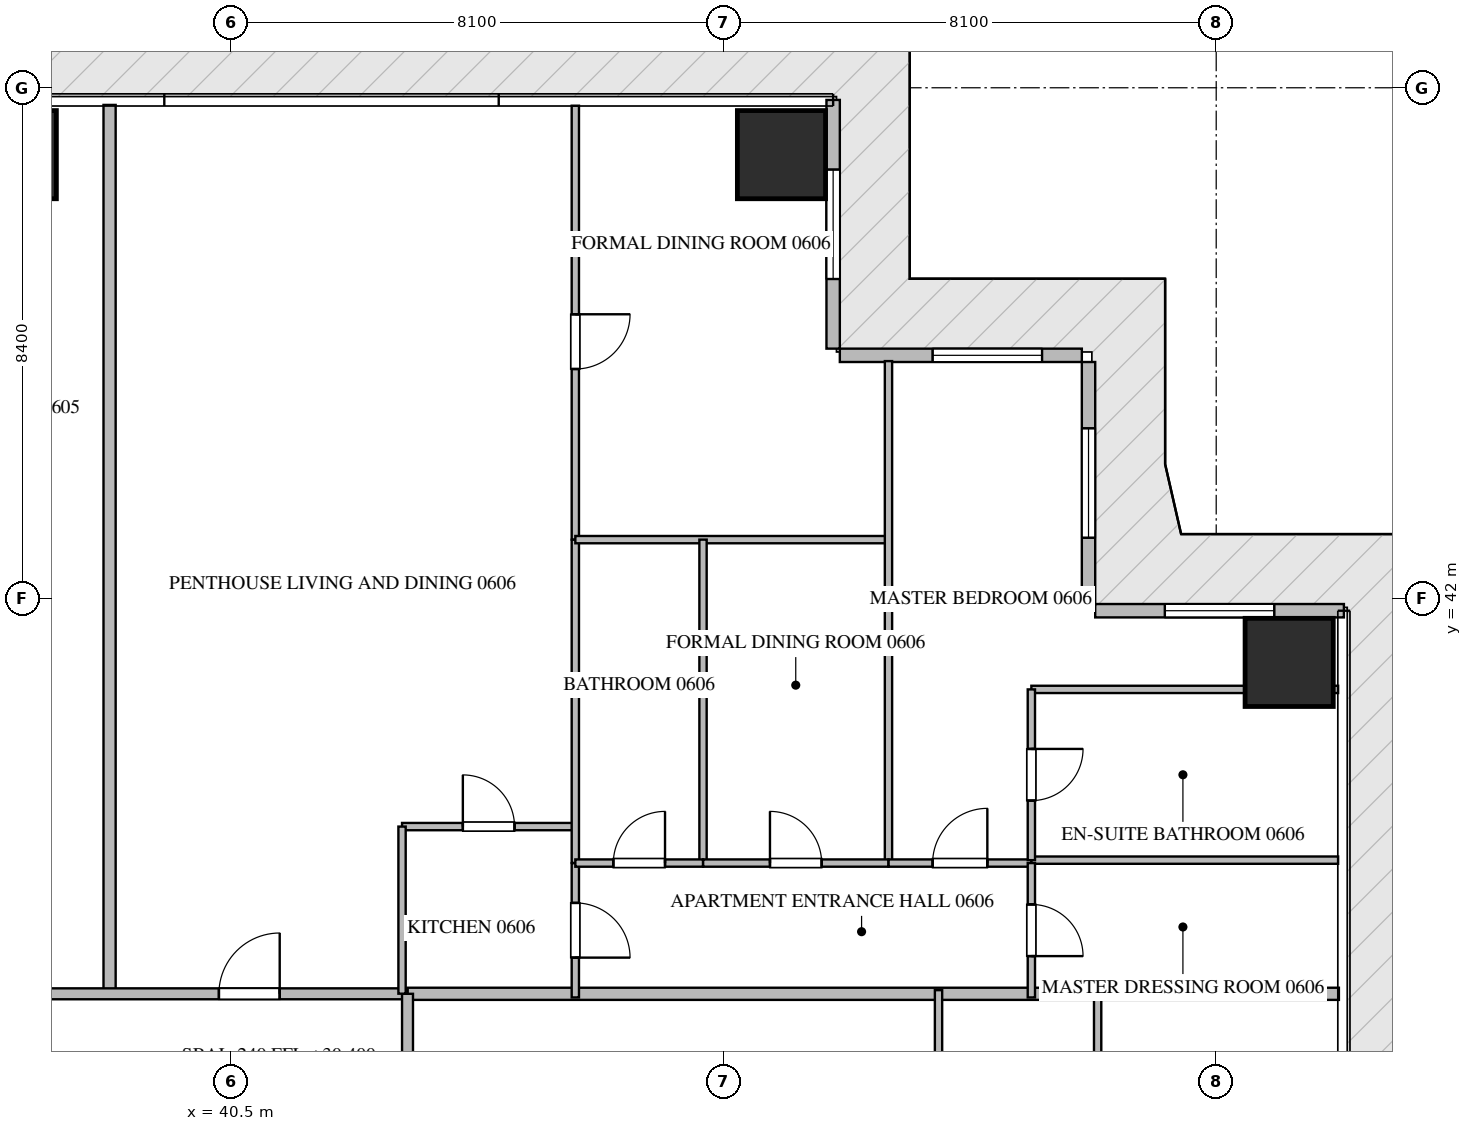
"""IFC4 building model, lengths in metres.
Left out: names, types, materials, properties, quantities, classifications, styles, units other than length and angle.
Written with IfcOpenShell. Run it as: python <this file> out.ifc"""

import sys

from ifc_helpers import new_model, si_unit, direction, frame, frame_2d, origin, origin_2d, place, context, subcontext, project, spatial, rectangle, extrude, source, transform, mapped, element, fill, save


model = new_model("IFC4")
c1 = context("Model", 3, precision=1e-05, world=origin(), true_north=direction((0.0, 1.0)))
c2 = subcontext(c1, "Body", "Model", "MODEL_VIEW")
j1 = project(units=[si_unit("LENGTHUNIT", "METRE"), si_unit("PLANEANGLEUNIT", "RADIAN")], contexts=[c1])
p1 = place(None, origin())
s1 = spatial("IfcSite", under=j1, at=p1, CompositionType="ELEMENT")
p2 = place(p1, origin())
s2 = spatial("IfcBuilding", under=s1, at=p2, CompositionType="ELEMENT")
p3 = place(p2, frame((0.0, 0.0, 30.45)))
s3 = spatial("IfcBuildingStorey", under=s2, at=p3, CompositionType="ELEMENT", Elevation=30.45)
m1 = source(origin(), c2, "Body", "SweptSolid", [
    extrude(rectangle(XDim=1.45, YDim=1.45, at=origin_2d()), origin(), (0.0, 0.0, 1.0), 3.75),
])
for number, where, z_axis, x_axis in (
    (1, (36.9, 49.3, -0.26), (0.0, 0.0, 1.0), (1.0, 0.0, 0.0)),
    (2, (49.55, 49.3, -0.26), (0.0, 0.0, 1.0), (1.0, 0.0, 0.0)),
    (3, (57.9, 40.95, -0.26), (0.0, 0.0, 1.0), (1.0, 0.0, 0.0)),
):
    element("IfcColumn", number, at=place(p3, frame(where, z_axis=z_axis, x_axis=x_axis)), inside=s3, PredefinedType="COLUMN", context=c2, shape_type="MappedRepresentation", body=[
        mapped(m1, transform((0.0, 0.0, 0.0), scale=1.0)),
    ])
p4 = place(p3, frame((58.8, 41.8, 0.0), z_axis=(0.0, 0.0, 1.0), x_axis=(-1.0, 0.0, 0.0)))
e4 = element("IfcWall", 4, at=p4, inside=s3, PredefinedType="ELEMENTEDWALL", context=c2, shape_type="SweptSolid", body=[
    extrude(rectangle(XDim=4.09, YDim=0.22, at=frame_2d((2.045, 0.0))), origin(), (0.0, 0.0, 1.0), 3.475),
])
p5 = place(p4, frame((1.145, 0.0, 0.65)))
e5 = element("IfcOpeningElement", 5, at=p5, cuts=e4, PredefinedType="OPENING", context=c2, shape_type="SweptSolid", body=[
    extrude(rectangle(XDim=1.8, YDim=2.1, at=frame_2d((0.9, 1.05))), frame((0.0, 0.12, 0.0), z_axis=(0.0, -1.0, 0.0), x_axis=(1.0, 0.0, 0.0)), (0.0, 0.0, 1.0), 0.24),
])
p6 = place(p3, frame((54.6, 41.91, 0.0), z_axis=(0.0, 0.0, 1.0), x_axis=(0.0, 1.0, 0.0)))
e6 = element("IfcWall", 6, at=p6, inside=s3, PredefinedType="ELEMENTEDWALL", context=c2, shape_type="SweptSolid", body=[
    extrude(rectangle(XDim=3.98, YDim=0.22, at=frame_2d((1.99, 0.0))), origin(), (0.0, 0.0, 1.0), 3.475),
])
p7 = place(p6, frame((1.09, 0.0, 0.65)))
e7 = element("IfcOpeningElement", 7, at=p7, cuts=e6, PredefinedType="OPENING", context=c2, shape_type="SweptSolid", body=[
    extrude(rectangle(XDim=1.8, YDim=2.1, at=frame_2d((0.9, 1.05))), frame((0.0, 0.12, 0.0), z_axis=(0.0, -1.0, 0.0), x_axis=(1.0, 0.0, 0.0)), (0.0, 0.0, 1.0), 0.24),
])
p8 = place(p3, frame((54.49, 46.0, 0.0), z_axis=(0.0, 0.0, 1.0), x_axis=(-1.0, 0.0, 0.0)))
e8 = element("IfcWall", 8, at=p8, inside=s3, PredefinedType="ELEMENTEDWALL", context=c2, shape_type="SweptSolid", body=[
    extrude(rectangle(XDim=3.98, YDim=0.22, at=frame_2d((1.99, 0.0))), origin(), (0.0, 0.0, 1.0), 3.475),
])
p9 = place(p8, frame((0.654, 0.0, 0.65)))
e9 = element("IfcOpeningElement", 9, at=p9, cuts=e8, PredefinedType="OPENING", context=c2, shape_type="SweptSolid", body=[
    extrude(rectangle(XDim=1.8, YDim=2.1, at=frame_2d((0.9, 1.05))), frame((0.0, 0.12, 0.0), z_axis=(0.0, -1.0, 0.0), x_axis=(1.0, 0.0, 0.0)), (0.0, 0.0, 1.0), 0.24),
])
p10 = place(p3, frame((50.4, 46.11, 0.0), z_axis=(0.0, 0.0, 1.0), x_axis=(0.0, 1.0, 0.0)))
e10 = element("IfcWall", 10, at=p10, inside=s3, PredefinedType="ELEMENTEDWALL", context=c2, shape_type="SweptSolid", body=[
    extrude(rectangle(XDim=4.09, YDim=0.22, at=frame_2d((2.045, 0.0))), origin(), (0.0, 0.0, 1.0), 3.475),
])
p11 = place(p10, frame((1.145, 0.0, 0.65)))
e11 = element("IfcOpeningElement", 11, at=p11, cuts=e10, PredefinedType="OPENING", context=c2, shape_type="SweptSolid", body=[
    extrude(rectangle(XDim=1.8, YDim=2.1, at=frame_2d((0.9, 1.05))), frame((0.0, 0.12, 0.0), z_axis=(0.0, -1.0, 0.0), x_axis=(1.0, 0.0, 0.0)), (0.0, 0.0, 1.0), 0.24),
])
p12 = place(p3, frame((38.5, 35.5, 0.0), z_axis=(0.0, 0.0, 1.0), x_axis=(0.0, 1.0, 0.0)))
e12 = element("IfcWall", 12, at=p12, inside=s3, PredefinedType="PARTITIONING", context=c2, shape_type="SweptSolid", body=[
    extrude(rectangle(XDim=14.618, YDim=0.2, at=frame_2d((7.309, 0.0))), origin(), (0.0, 0.0, 1.0), 3.49),
])
p13 = place(p3, frame((43.4, 35.5, 0.0), z_axis=(0.0, 0.0, 1.0), x_axis=(1.0, 0.0, 0.0)))
e13 = element("IfcWall", 13, at=p13, inside=s3, PredefinedType="PARTITIONING", context=c2, shape_type="SweptSolid", body=[
    extrude(rectangle(XDim=15.318, YDim=0.2, at=frame_2d((7.659, 0.0))), origin(), (0.0, 0.0, 1.0), 3.49),
])
p14 = place(p3, frame((21.402, 35.5, 0.0), z_axis=(0.0, 0.0, 1.0), x_axis=(1.0, 0.0, 0.0)))
e14 = element("IfcWall", 14, at=p14, inside=s3, PredefinedType="PARTITIONING", context=c2, shape_type="SweptSolid", body=[
    extrude(rectangle(XDim=21.996, YDim=0.18, at=frame_2d((10.998, 0.0))), origin(), (0.0, 0.0, 1.0), 3.49),
])
p15 = place(p14, frame((2.1, 0.0, 0.0)))
e15 = element("IfcOpeningElement", 15, at=p15, cuts=e14, PredefinedType="OPENING", context=c2, shape_type="SweptSolid", body=[
    extrude(rectangle(XDim=1.0, YDim=2.15, at=frame_2d((0.5, 1.075))), frame((0.0, 0.1, 0.0), z_axis=(0.0, -1.0, 0.0), x_axis=(1.0, 0.0, 0.0)), (0.0, 0.0, 1.0), 0.2),
])
p16 = place(p14, frame((14.277, 0.0, 0.0)))
e16 = element("IfcOpeningElement", 16, at=p16, cuts=e14, PredefinedType="OPENING", context=c2, shape_type="SweptSolid", body=[
    extrude(rectangle(XDim=1.0, YDim=2.15, at=frame_2d((0.5, 1.075))), frame((0.0, 0.1, 0.0), z_axis=(0.0, -1.0, 0.0), x_axis=(1.0, 0.0, 0.0)), (0.0, 0.0, 1.0), 0.2),
])
p17 = place(p14, frame((18.896, 0.0, 0.0)))
e17 = element("IfcOpeningElement", 17, at=p17, cuts=e14, PredefinedType="OPENING", context=c2, shape_type="SweptSolid", body=[
    extrude(rectangle(XDim=1.0, YDim=2.15, at=frame_2d((0.5, 1.075))), frame((0.0, 0.1, 0.0), z_axis=(0.0, -1.0, 0.0), x_axis=(1.0, 0.0, 0.0)), (0.0, 0.0, 1.0), 0.2),
])
p18 = place(p3, frame((43.4, 14.9, 0.0), z_axis=(0.0, 0.0, 1.0), x_axis=(0.0, 1.0, 0.0)))
e18 = element("IfcWall", 18, at=p18, inside=s3, PredefinedType="PARTITIONING", context=c2, shape_type="SweptSolid", body=[
    extrude(rectangle(XDim=20.6, YDim=0.18, at=frame_2d((10.3, 0.0))), origin(), (0.0, 0.0, 1.0), 3.49),
])
p19 = place(p18, frame((1.96, 0.0, 0.0)))
e19 = element("IfcOpeningElement", 19, at=p19, cuts=e18, PredefinedType="OPENING", context=c2, shape_type="SweptSolid", body=[
    extrude(rectangle(XDim=1.0, YDim=2.15, at=frame_2d((0.5, 1.075))), frame((0.0, 0.1, 0.0), z_axis=(0.0, -1.0, 0.0), x_axis=(1.0, 0.0, 0.0)), (0.0, 0.0, 1.0), 0.2),
])
p20 = place(p3, frame((43.31, 38.25, 0.0), z_axis=(0.0, 0.0, 1.0), x_axis=(1.0, 0.0, 0.0)))
e20 = element("IfcWall", 20, at=p20, inside=s3, PredefinedType="PARTITIONING", context=c2, shape_type="SweptSolid", body=[
    extrude(rectangle(XDim=2.85, YDim=0.12, at=frame_2d((1.425, 0.0))), origin(), (0.0, 0.0, 1.0), 3.49),
])
p21 = place(p20, frame((1.0, 0.0, 0.0)))
e21 = element("IfcOpeningElement", 21, at=p21, cuts=e20, PredefinedType="OPENING", context=c2, shape_type="SweptSolid", body=[
    extrude(rectangle(XDim=0.85, YDim=2.1, at=frame_2d((0.425, 1.05))), frame((0.0, 0.07, 0.0), z_axis=(0.0, -1.0, 0.0), x_axis=(1.0, 0.0, 0.0)), (0.0, 0.0, 1.0), 0.14),
])
p22 = place(p3, frame((43.31, 38.25, 0.0), z_axis=(0.0, 0.0, 1.0), x_axis=(0.0, -1.0, 0.0)))
e22 = element("IfcWall", 22, at=p22, inside=s3, PredefinedType="PARTITIONING", context=c2, shape_type="SweptSolid", body=[
    extrude(rectangle(XDim=2.748, YDim=0.12, at=frame_2d((1.374, 0.0))), origin(), (0.0, 0.0, 1.0), 3.49),
])
p23 = place(p3, frame((46.16, 37.65, 0.0), z_axis=(0.0, 0.0, 1.0), x_axis=(0.0, -1.0, 0.0)))
e23 = element("IfcWall", 23, at=p23, inside=s3, PredefinedType="PARTITIONING", context=c2, shape_type="SweptSolid", body=[
    extrude(rectangle(XDim=2.21, YDim=0.12, at=frame_2d((1.105, 0.0))), origin(), (0.0, 0.0, 1.0), 3.49),
])
p24 = place(p23, frame((0.655, 0.0, 0.0)))
e24 = element("IfcOpeningElement", 24, at=p24, cuts=e23, PredefinedType="OPENING", context=c2, shape_type="SweptSolid", body=[
    extrude(rectangle(XDim=0.9, YDim=2.1, at=frame_2d((0.45, 1.05))), frame((0.0, 0.07, 0.0), z_axis=(0.0, -1.0, 0.0), x_axis=(1.0, 0.0, 0.0)), (0.0, 0.0, 1.0), 0.14),
])
p25 = place(p3, frame((46.16, 50.105, 0.0), z_axis=(0.0, 0.0, 1.0), x_axis=(0.0, -1.0, 0.0)))
e25 = element("IfcWall", 25, at=p25, inside=s3, PredefinedType="PARTITIONING", context=c2, shape_type="SweptSolid", body=[
    extrude(rectangle(XDim=7.136, YDim=0.12, at=frame_2d((3.568, 0.0))), origin(), (0.0, 0.0, 1.0), 3.49),
])
p26 = place(p25, frame((3.43, 0.0, 0.0)))
e26 = element("IfcOpeningElement", 26, at=p26, cuts=e25, PredefinedType="OPENING", context=c2, shape_type="SweptSolid", body=[
    extrude(rectangle(XDim=0.9, YDim=2.1, at=frame_2d((0.45, 1.05))), frame((0.0, 0.07, 0.0), z_axis=(0.0, -1.0, 0.0), x_axis=(1.0, 0.0, 0.0)), (0.0, 0.0, 1.0), 0.14),
])
p27 = place(p3, frame((46.16, 42.967, 0.0), z_axis=(0.0, 0.0, 1.0), x_axis=(0.0, -1.0, 0.0)))
e27 = element("IfcWall", 27, at=p27, inside=s3, PredefinedType="PARTITIONING", context=c2, shape_type="SweptSolid", body=[
    extrude(rectangle(XDim=5.315, YDim=0.12, at=frame_2d((2.657, 0.0))), origin(), (0.0, 0.0, 1.0), 3.49),
])
p28 = place(p3, frame((46.16, 42.969, 0.0), z_axis=(0.0, 0.0, 1.0), x_axis=(1.0, 0.0, 0.0)))
e28 = element("IfcWall", 28, at=p28, inside=s3, PredefinedType="PARTITIONING", context=c2, shape_type="SweptSolid", body=[
    extrude(rectangle(XDim=5.15, YDim=0.12, at=frame_2d((2.575, 0.0))), origin(), (0.0, 0.0, 1.0), 3.49),
])
p29 = place(p3, frame((51.31, 45.905, 0.0), z_axis=(0.0, 0.0, 1.0), x_axis=(0.0, -1.0, 0.0)))
e29 = element("IfcWall", 29, at=p29, inside=s3, PredefinedType="PARTITIONING", context=c2, shape_type="SweptSolid", body=[
    extrude(rectangle(XDim=8.255, YDim=0.12, at=frame_2d((4.127, 0.0))), origin(), (0.0, 0.0, 1.0), 3.49),
])
p30 = place(p3, frame((48.26, 42.969, 0.0), z_axis=(0.0, 0.0, 1.0), x_axis=(0.0, -1.0, 0.0)))
e30 = element("IfcWall", 30, at=p30, inside=s3, PredefinedType="PARTITIONING", context=c2, shape_type="SweptSolid", body=[
    extrude(rectangle(XDim=5.319, YDim=0.12, at=frame_2d((2.66, 0.0))), origin(), (0.0, 0.0, 1.0), 3.49),
])
p31 = place(p3, frame((46.16, 37.65, 0.0), z_axis=(0.0, 0.0, 1.0), x_axis=(1.0, 0.0, 0.0)))
e31 = element("IfcWall", 31, at=p31, inside=s3, PredefinedType="PARTITIONING", context=c2, shape_type="SweptSolid", body=[
    extrude(rectangle(XDim=2.1, YDim=0.12, at=frame_2d((1.05, 0.0))), origin(), (0.0, 0.0, 1.0), 3.49),
])
p32 = place(p31, frame((0.625, 0.0, 0.0)))
e32 = element("IfcOpeningElement", 32, at=p32, cuts=e31, PredefinedType="OPENING", context=c2, shape_type="SweptSolid", body=[
    extrude(rectangle(XDim=0.85, YDim=2.1, at=frame_2d((0.425, 1.05))), frame((0.0, 0.07, 0.0), z_axis=(0.0, -1.0, 0.0), x_axis=(1.0, 0.0, 0.0)), (0.0, 0.0, 1.0), 0.14),
])
p33 = place(p3, frame((48.262, 37.65, 0.0), z_axis=(0.0, 0.0, 1.0), x_axis=(1.0, 0.0, 0.0)))
e33 = element("IfcWall", 33, at=p33, inside=s3, PredefinedType="PARTITIONING", context=c2, shape_type="SweptSolid", body=[
    extrude(rectangle(XDim=3.048, YDim=0.12, at=frame_2d((1.524, 0.0))), origin(), (0.0, 0.0, 1.0), 3.49),
])
p34 = place(p33, frame((1.099, 0.0, 0.0)))
e34 = element("IfcOpeningElement", 34, at=p34, cuts=e33, PredefinedType="OPENING", context=c2, shape_type="SweptSolid", body=[
    extrude(rectangle(XDim=0.85, YDim=2.1, at=frame_2d((0.425, 1.05))), frame((0.0, 0.07, 0.0), z_axis=(0.0, -1.0, 0.0), x_axis=(1.0, 0.0, 0.0)), (0.0, 0.0, 1.0), 0.14),
])
p35 = place(p3, frame((51.312, 37.65, 0.0), z_axis=(0.0, 0.0, 1.0), x_axis=(1.0, 0.0, 0.0)))
e35 = element("IfcWall", 35, at=p35, inside=s3, PredefinedType="PARTITIONING", context=c2, shape_type="SweptSolid", body=[
    extrude(rectangle(XDim=2.348, YDim=0.12, at=frame_2d((1.174, 0.0))), origin(), (0.0, 0.0, 1.0), 3.49),
])
p36 = place(p35, frame((0.724, 0.0, 0.0)))
e36 = element("IfcOpeningElement", 36, at=p36, cuts=e35, PredefinedType="OPENING", context=c2, shape_type="SweptSolid", body=[
    extrude(rectangle(XDim=0.9, YDim=2.1, at=frame_2d((0.45, 1.05))), frame((0.0, 0.07, 0.0), z_axis=(0.0, -1.0, 0.0), x_axis=(1.0, 0.0, 0.0)), (0.0, 0.0, 1.0), 0.14),
])
p37 = place(p3, frame((53.66, 40.506, 0.0), z_axis=(0.0, 0.0, 1.0), x_axis=(1.0, 0.0, 0.0)))
e37 = element("IfcWall", 37, at=p37, inside=s3, PredefinedType="PARTITIONING", context=c2, shape_type="SweptSolid", body=[
    extrude(rectangle(XDim=5.045, YDim=0.12, at=frame_2d((2.522, 0.0))), origin(), (0.0, 0.0, 1.0), 3.49),
])
p38 = place(p3, frame((53.662, 37.698, 0.0), z_axis=(0.0, 0.0, 1.0), x_axis=(1.0, 0.0, 0.0)))
e38 = element("IfcWall", 38, at=p38, inside=s3, PredefinedType="PARTITIONING", context=c2, shape_type="SweptSolid", body=[
    extrude(rectangle(XDim=5.043, YDim=0.12, at=frame_2d((2.521, 0.0))), origin(), (0.0, 0.0, 1.0), 3.49),
])
p39 = place(p3, frame((53.66, 40.506, 0.0), z_axis=(0.0, 0.0, 1.0), x_axis=(0.0, -1.0, 0.0)))
e39 = element("IfcWall", 39, at=p39, inside=s3, PredefinedType="PARTITIONING", context=c2, shape_type="SweptSolid", body=[
    extrude(rectangle(XDim=2.808, YDim=0.12, at=frame_2d((1.404, 0.0))), origin(), (0.0, 0.0, 1.0), 3.49),
])
p40 = place(p39, frame((0.979, 0.0, 0.0)))
e40 = element("IfcOpeningElement", 40, at=p40, cuts=e39, PredefinedType="OPENING", context=c2, shape_type="SweptSolid", body=[
    extrude(rectangle(XDim=0.85, YDim=2.1, at=frame_2d((0.425, 1.05))), frame((0.0, 0.07, 0.0), z_axis=(0.0, -1.0, 0.0), x_axis=(1.0, 0.0, 0.0)), (0.0, 0.0, 1.0), 0.14),
])
p41 = place(p3, frame((53.66, 37.65, 0.0), z_axis=(0.0, 0.0, 1.0), x_axis=(0.0, -1.0, 0.0)))
e41 = element("IfcWall", 41, at=p41, inside=s3, PredefinedType="PARTITIONING", context=c2, shape_type="SweptSolid", body=[
    extrude(rectangle(XDim=2.21, YDim=0.12, at=frame_2d((1.105, 0.0))), origin(), (0.0, 0.0, 1.0), 3.49),
])
p42 = place(p41, frame((0.68, 0.0, 0.0)))
e42 = element("IfcOpeningElement", 42, at=p42, cuts=e41, PredefinedType="OPENING", context=c2, shape_type="SweptSolid", body=[
    extrude(rectangle(XDim=0.85, YDim=2.1, at=frame_2d((0.425, 1.05))), frame((0.0, 0.07, 0.0), z_axis=(0.0, -1.0, 0.0), x_axis=(1.0, 0.0, 0.0)), (0.0, 0.0, 1.0), 0.14),
])
for number, where, z_axis, x_axis in (
    (43, (54.75, 30.15, 0.0), (0.0, 0.0, 1.0), (0.0, 1.0, 0.0)),
    (44, (52.133, 30.15, 0.0), (0.0, 0.0, 1.0), (0.0, 1.0, 0.0)),
):
    element("IfcWall", number, at=place(p3, frame(where, z_axis=z_axis, x_axis=x_axis)), inside=s3, PredefinedType="PARTITIONING", context=c2, shape_type="SweptSolid", body=[
        extrude(rectangle(XDim=5.41, YDim=0.12, at=frame_2d((2.705, 0.0))), origin(), (0.0, 0.0, 1.0), 3.49),
    ])
m2 = source(origin(), c2, "Body", "SweptSolid", [
    extrude(rectangle(XDim=1.8, YDim=2.1, at=frame_2d((0.9, 1.05))), frame((0.0, 0.03, 0.0), z_axis=(0.0, -1.0, 0.0), x_axis=(1.0, 0.0, 0.0)), (0.0, 0.0, 1.0), 0.06),
])
p43 = place(p5, origin())
e45 = element("IfcWindow", 45, at=p43, inside=s3, PartitioningType="SINGLE_PANEL", PredefinedType="WINDOW", context=c2, shape_type="MappedRepresentation", body=[
    mapped(m2, transform((0.0, 0.0, 0.0), scale=1.0)),
])
fill(e5, e45)
p44 = place(p7, origin())
e46 = element("IfcWindow", 46, at=p44, inside=s3, PartitioningType="SINGLE_PANEL", PredefinedType="WINDOW", context=c2, shape_type="MappedRepresentation", body=[
    mapped(m2, transform((0.0, 0.0, 0.0), scale=1.0)),
])
fill(e7, e46)
p45 = place(p9, origin())
e47 = element("IfcWindow", 47, at=p45, inside=s3, PartitioningType="SINGLE_PANEL", PredefinedType="WINDOW", context=c2, shape_type="MappedRepresentation", body=[
    mapped(m2, transform((0.0, 0.0, 0.0), scale=1.0)),
])
fill(e9, e47)
p46 = place(p11, origin())
e48 = element("IfcWindow", 48, at=p46, inside=s3, PartitioningType="SINGLE_PANEL", PredefinedType="WINDOW", context=c2, shape_type="MappedRepresentation", body=[
    mapped(m2, transform((0.0, 0.0, 0.0), scale=1.0)),
])
fill(e11, e48)
m3 = source(origin(), c2, "Body", "SweptSolid", [
    extrude(rectangle(XDim=1.0, YDim=2.15, at=frame_2d((0.5, 1.075))), frame((0.0, 0.025, 0.0), z_axis=(0.0, -1.0, 0.0), x_axis=(1.0, 0.0, 0.0)), (0.0, 0.0, 1.0), 0.05),
])
p47 = place(p17, origin())
e49 = element("IfcDoor", 49, at=p47, inside=s3, OperationType="SINGLE_SWING_RIGHT", PredefinedType="DOOR", context=c2, shape_type="MappedRepresentation", body=[
    mapped(m3, transform((0.0, 0.0, 0.0), scale=1.0)),
])
fill(e17, e49)
m4 = source(origin(), c2, "Body", "SweptSolid", [
    extrude(rectangle(XDim=0.85, YDim=2.1, at=frame_2d((0.425, 1.05))), frame((0.0, 0.025, 0.0), z_axis=(0.0, -1.0, 0.0), x_axis=(1.0, 0.0, 0.0)), (0.0, 0.0, 1.0), 0.05),
])
p48 = place(p21, origin())
e50 = element("IfcDoor", 50, at=p48, inside=s3, OperationType="SINGLE_SWING_LEFT", PredefinedType="DOOR", context=c2, shape_type="MappedRepresentation", body=[
    mapped(m4, transform((0.0, 0.0, 0.0), scale=1.0)),
])
fill(e21, e50)
m5 = source(origin(), c2, "Body", "SweptSolid", [
    extrude(rectangle(XDim=0.9, YDim=2.1, at=frame_2d((0.45, 1.05))), frame((0.0, 0.025, 0.0), z_axis=(0.0, -1.0, 0.0), x_axis=(1.0, 0.0, 0.0)), (0.0, 0.0, 1.0), 0.05),
])
p49 = place(p24, origin())
e51 = element("IfcDoor", 51, at=p49, inside=s3, OperationType="SINGLE_SWING_RIGHT", PredefinedType="DOOR", context=c2, shape_type="MappedRepresentation", body=[
    mapped(m5, transform((0.0, 0.0, 0.0), scale=1.0)),
])
fill(e24, e51)
p50 = place(p26, origin())
e52 = element("IfcDoor", 52, at=p50, inside=s3, OperationType="SINGLE_SWING_LEFT", PredefinedType="DOOR", context=c2, shape_type="MappedRepresentation", body=[
    mapped(m5, transform((0.0, 0.0, 0.0), scale=1.0)),
])
fill(e26, e52)
p51 = place(p32, origin())
e53 = element("IfcDoor", 53, at=p51, inside=s3, OperationType="SINGLE_SWING_RIGHT", PredefinedType="DOOR", context=c2, shape_type="MappedRepresentation", body=[
    mapped(m4, transform((0.0, 0.0, 0.0), scale=1.0)),
])
fill(e32, e53)
p52 = place(p34, origin())
e54 = element("IfcDoor", 54, at=p52, inside=s3, OperationType="SINGLE_SWING_LEFT", PredefinedType="DOOR", context=c2, shape_type="MappedRepresentation", body=[
    mapped(m4, transform((0.0, 0.0, 0.0), scale=1.0)),
])
fill(e34, e54)
p53 = place(p36, origin())
e55 = element("IfcDoor", 55, at=p53, inside=s3, OperationType="SINGLE_SWING_RIGHT", PredefinedType="DOOR", context=c2, shape_type="MappedRepresentation", body=[
    mapped(m5, transform((0.0, 0.0, 0.0), scale=1.0)),
])
fill(e36, e55)
p54 = place(p40, origin())
e56 = element("IfcDoor", 56, at=p54, inside=s3, OperationType="SINGLE_SWING_LEFT", PredefinedType="DOOR", context=c2, shape_type="MappedRepresentation", body=[
    mapped(m4, transform((0.0, 0.0, 0.0), scale=1.0)),
])
fill(e40, e56)
p55 = place(p42, origin())
e57 = element("IfcDoor", 57, at=p55, inside=s3, OperationType="SINGLE_SWING_RIGHT", PredefinedType="DOOR", context=c2, shape_type="MappedRepresentation", body=[
    mapped(m4, transform((0.0, 0.0, 0.0), scale=1.0)),
])
fill(e42, e57)
save(model, sys.argv[1])
